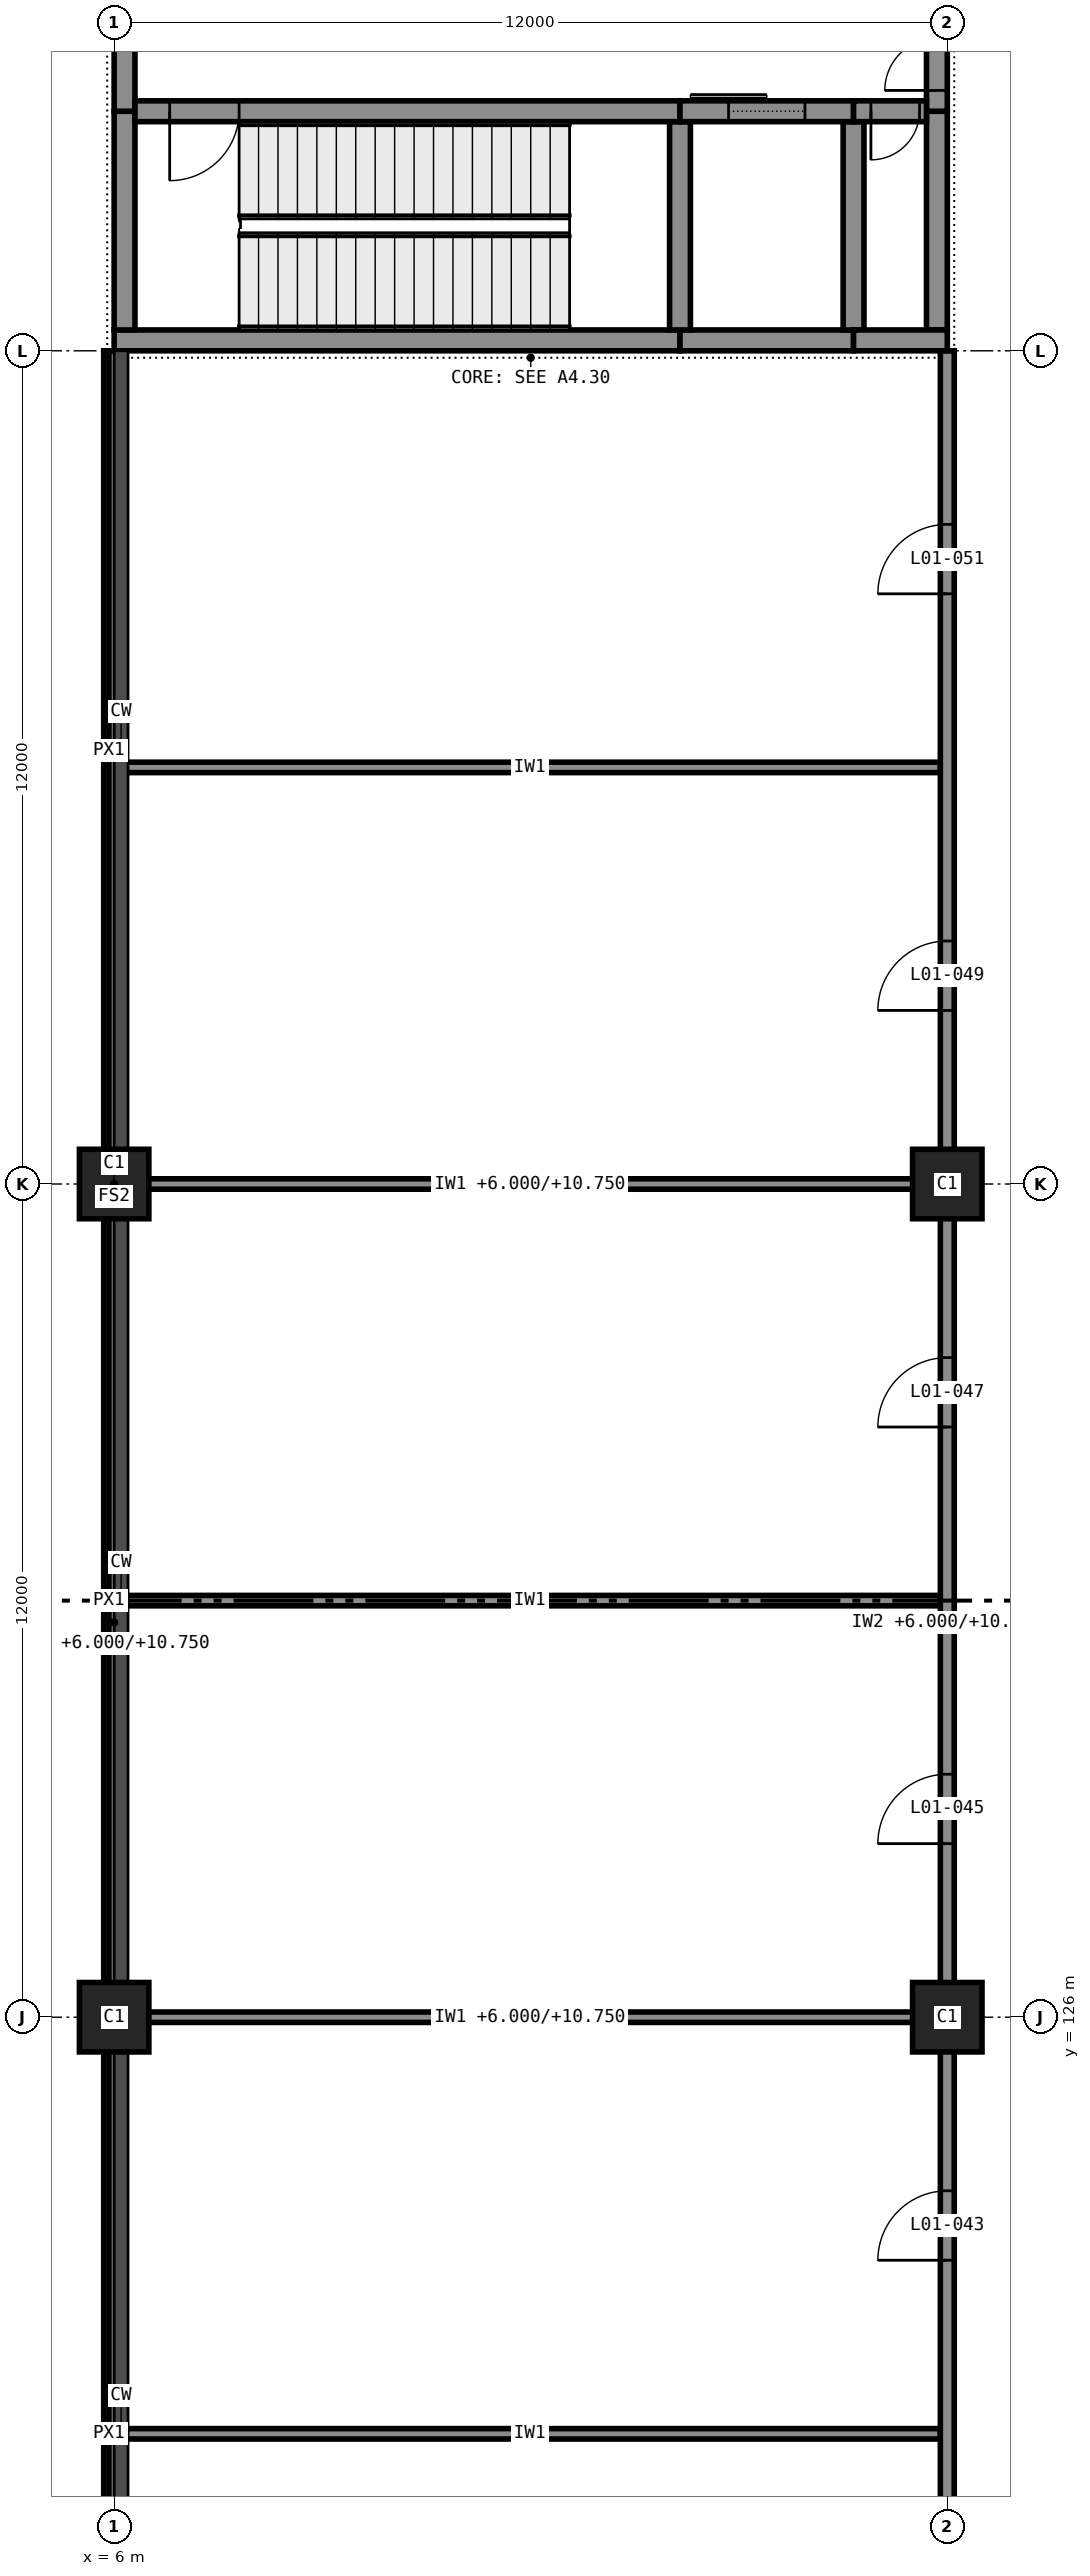
"""IFC4 building model, lengths in metres.
Left out: names, types, materials, properties, quantities, classifications, styles, units other than length and angle.
Written with IfcOpenShell. Run it as: python <this file> out.ifc"""

import sys

from ifc_helpers import new_model, si_unit, direction, frame, frame_2d, origin, origin_2d, place, context, subcontext, project, spatial, rectangle, extrude, element, fill, save


model = new_model("IFC4")
c1 = context("Model", 3, precision=1e-05, world=origin(), true_north=direction((0.0, 1.0)))
c2 = subcontext(c1, "Body", "Model", "MODEL_VIEW")
j1 = project(units=[si_unit("LENGTHUNIT", "METRE"), si_unit("PLANEANGLEUNIT", "RADIAN")], contexts=[c1])
p1 = place(None, origin())
s1 = spatial("IfcSite", under=j1, at=p1, CompositionType="ELEMENT")
p2 = place(p1, origin())
s2 = spatial("IfcBuilding", under=s1, at=p2, CompositionType="ELEMENT")
p3 = place(p2, frame((0.0, 0.0, 6.0)))
s3 = spatial("IfcBuildingStorey", under=s2, at=p3, CompositionType="ELEMENT", Elevation=6.0)
for number, where, z_axis, x_axis in (
    (1, (6.0, 126.0, 0.0), (0.0, 0.0, 1.0), (1.0, 0.0, 0.0)),
    (2, (6.0, 138.0, 0.0), (0.0, 0.0, 1.0), (1.0, 0.0, 0.0)),
    (3, (18.0, 126.0, 0.0), (0.0, 0.0, 1.0), (1.0, 0.0, 0.0)),
    (4, (18.0, 138.0, 0.0), (0.0, 0.0, 1.0), (1.0, 0.0, 0.0)),
):
    element("IfcColumn", number, at=place(p3, frame(where, z_axis=z_axis, x_axis=x_axis)), inside=s3, PredefinedType="COLUMN", context=c2, shape_type="SweptSolid", body=[
        extrude(rectangle(XDim=1.0, YDim=1.0, at=origin_2d()), origin(), (0.0, 0.0, 1.0), 6.0),
    ])
p4 = place(p3, frame((6.0, 150.15, 0.0), z_axis=(0.0, 0.0, 1.0), x_axis=(1.0, 0.0, 0.0)))
e5 = element("IfcWall", 5, at=p4, inside=s3, PredefinedType="SHEAR", context=c2, shape_type="SweptSolid", body=[
    extrude(rectangle(XDim=8.15, YDim=0.3, at=frame_2d((4.075, 0.0))), origin(), (0.0, 0.0, 1.0), 5.75),
])
p5 = place(p3, frame((14.15, 150.15, 0.0), z_axis=(0.0, 0.0, 1.0), x_axis=(1.0, 0.0, 0.0)))
e6 = element("IfcWall", 6, at=p5, inside=s3, PredefinedType="SHEAR", context=c2, shape_type="SweptSolid", body=[
    extrude(rectangle(XDim=2.5, YDim=0.3, at=frame_2d((1.25, 0.0))), origin(), (0.0, 0.0, 1.0), 5.75),
])
p6 = place(p3, frame((16.65, 150.15, 0.0), z_axis=(0.0, 0.0, 1.0), x_axis=(1.0, 0.0, 0.0)))
e7 = element("IfcWall", 7, at=p6, inside=s3, PredefinedType="SHEAR", context=c2, shape_type="SweptSolid", body=[
    extrude(rectangle(XDim=1.35, YDim=0.3, at=frame_2d((0.675, 0.0))), origin(), (0.0, 0.0, 1.0), 5.75),
])
p7 = place(p3, frame((6.3, 153.45, 0.0), z_axis=(0.0, 0.0, 1.0), x_axis=(1.0, 0.0, 0.0)))
e8 = element("IfcWall", 8, at=p7, inside=s3, PredefinedType="SHEAR", context=c2, shape_type="SweptSolid", body=[
    extrude(rectangle(XDim=7.85, YDim=0.3, at=frame_2d((3.925, 0.0))), origin(), (0.0, 0.0, 1.0), 5.75),
])
p8 = place(p7, frame((0.5, 0.0, 0.0)))
e9 = element("IfcOpeningElement", 9, at=p8, cuts=e8, PredefinedType="OPENING", context=c2, shape_type="SweptSolid", body=[
    extrude(rectangle(XDim=1.0, YDim=2.1, at=frame_2d((0.5, 1.05))), frame((0.0, 0.16, 0.0), z_axis=(0.0, -1.0, 0.0), x_axis=(1.0, 0.0, 0.0)), (0.0, 0.0, 1.0), 0.32),
])
p9 = place(p3, frame((14.15, 153.45, 0.0), z_axis=(0.0, 0.0, 1.0), x_axis=(1.0, 0.0, 0.0)))
e10 = element("IfcWall", 10, at=p9, inside=s3, PredefinedType="SHEAR", context=c2, shape_type="SweptSolid", body=[
    extrude(rectangle(XDim=2.5, YDim=0.3, at=frame_2d((1.25, 0.0))), origin(), (0.0, 0.0, 1.0), 5.75),
])
p10 = place(p9, frame((0.7, 0.0, 0.0)))
e11 = element("IfcOpeningElement", 11, at=p10, cuts=e10, PredefinedType="OPENING", context=c2, shape_type="SweptSolid", body=[
    extrude(rectangle(XDim=1.1, YDim=2.1, at=frame_2d((0.55, 1.05))), frame((0.0, 0.16, 0.0), z_axis=(0.0, -1.0, 0.0), x_axis=(1.0, 0.0, 0.0)), (0.0, 0.0, 1.0), 0.32),
])
p11 = place(p3, frame((16.65, 153.45, 0.0), z_axis=(0.0, 0.0, 1.0), x_axis=(1.0, 0.0, 0.0)))
e12 = element("IfcWall", 12, at=p11, inside=s3, PredefinedType="SHEAR", context=c2, shape_type="SweptSolid", body=[
    extrude(rectangle(XDim=1.05, YDim=0.3, at=frame_2d((0.525, 0.0))), origin(), (0.0, 0.0, 1.0), 5.75),
])
p12 = place(p11, frame((0.25, 0.0, 0.0)))
e13 = element("IfcOpeningElement", 13, at=p12, cuts=e12, PredefinedType="OPENING", context=c2, shape_type="SweptSolid", body=[
    extrude(rectangle(XDim=0.7, YDim=2.1, at=frame_2d((0.35, 1.05))), frame((0.0, 0.16, 0.0), z_axis=(0.0, -1.0, 0.0), x_axis=(1.0, 0.0, 0.0)), (0.0, 0.0, 1.0), 0.32),
])
p13 = place(p3, frame((6.15, 150.3, 0.0), z_axis=(0.0, 0.0, 1.0), x_axis=(0.0, 1.0, 0.0)))
e14 = element("IfcWall", 14, at=p13, inside=s3, PredefinedType="SHEAR", context=c2, shape_type="SweptSolid", body=[
    extrude(rectangle(XDim=3.15, YDim=0.3, at=frame_2d((1.575, 0.0))), origin(), (0.0, 0.0, 1.0), 5.75),
])
p14 = place(p3, frame((6.15, 153.45, 0.0), z_axis=(0.0, 0.0, 1.0), x_axis=(0.0, 1.0, 0.0)))
e15 = element("IfcWall", 15, at=p14, inside=s3, PredefinedType="SHEAR", context=c2, shape_type="SweptSolid", body=[
    extrude(rectangle(XDim=5.1, YDim=0.3, at=frame_2d((2.55, 0.0))), origin(), (0.0, 0.0, 1.0), 5.75),
])
p15 = place(p3, frame((17.85, 150.3, 0.0), z_axis=(0.0, 0.0, 1.0), x_axis=(0.0, 1.0, 0.0)))
e16 = element("IfcWall", 16, at=p15, inside=s3, PredefinedType="SHEAR", context=c2, shape_type="SweptSolid", body=[
    extrude(rectangle(XDim=3.15, YDim=0.3, at=frame_2d((1.575, 0.0))), origin(), (0.0, 0.0, 1.0), 5.75),
])
p16 = place(p3, frame((17.85, 153.45, 0.0), z_axis=(0.0, 0.0, 1.0), x_axis=(0.0, 1.0, 0.0)))
e17 = element("IfcWall", 17, at=p16, inside=s3, PredefinedType="SHEAR", context=c2, shape_type="SweptSolid", body=[
    extrude(rectangle(XDim=5.1, YDim=0.3, at=frame_2d((2.55, 0.0))), origin(), (0.0, 0.0, 1.0), 5.75),
])
p17 = place(p16, frame((0.3, 0.0, 0.0)))
e18 = element("IfcOpeningElement", 18, at=p17, cuts=e17, PredefinedType="OPENING", context=c2, shape_type="SweptSolid", body=[
    extrude(rectangle(XDim=1.5, YDim=2.1, at=frame_2d((0.75, 1.05))), frame((0.0, 0.16, 0.0), z_axis=(0.0, -1.0, 0.0), x_axis=(1.0, 0.0, 0.0)), (0.0, 0.0, 1.0), 0.32),
])
for number, where, z_axis, x_axis in (
    (19, (14.15, 150.3, 0.0), (0.0, 0.0, 1.0), (0.0, 1.0, 0.0)),
    (20, (16.65, 150.3, 0.0), (0.0, 0.0, 1.0), (0.0, 1.0, 0.0)),
):
    element("IfcWall", number, at=place(p3, frame(where, z_axis=z_axis, x_axis=x_axis)), inside=s3, PredefinedType="SHEAR", context=c2, shape_type="SweptSolid", body=[
        extrude(rectangle(XDim=3.0, YDim=0.3, at=frame_2d((1.5, 0.0))), origin(), (0.0, 0.0, 1.0), 5.75),
    ])
p18 = place(p3, frame((5.925, 150.0, 5.75), z_axis=(0.0, 0.0, 1.0), x_axis=(0.0, -1.0, 0.0)))
e21 = element("IfcWall", 21, at=p18, inside=s3, PredefinedType="STANDARD", context=c2, shape_type="SweptSolid", body=[
    extrude(rectangle(XDim=11.5, YDim=0.15, at=frame_2d((5.75, 0.0))), origin(), (0.0, 0.0, 1.0), 0.25),
])
for number, where, z_axis, x_axis in (
    (22, (5.925, 137.5, 5.75), (0.0, 0.0, 1.0), (0.0, -1.0, 0.0)),
    (23, (5.925, 125.5, 5.75), (0.0, 0.0, 1.0), (0.0, -1.0, 0.0)),
):
    element("IfcWall", number, at=place(p3, frame(where, z_axis=z_axis, x_axis=x_axis)), inside=s3, PredefinedType="STANDARD", context=c2, shape_type="SweptSolid", body=[
        extrude(rectangle(XDim=11.0, YDim=0.15, at=frame_2d((5.5, 0.0))), origin(), (0.0, 0.0, 1.0), 0.25),
    ])
p19 = place(p3, frame((6.075, 120.0, 0.0), z_axis=(0.0, 0.0, 1.0), x_axis=(1.0, 0.0, 0.0)))
e24 = element("IfcWall", 24, at=p19, inside=s3, PredefinedType="PARTITIONING", context=c2, shape_type="SweptSolid", body=[
    extrude(rectangle(XDim=11.825, YDim=0.15, at=frame_2d((5.913, 0.0))), origin(), (0.0, 0.0, 1.0), 5.75),
])
p20 = place(p3, frame((6.075, 126.0, 0.0), z_axis=(0.0, 0.0, 1.0), x_axis=(1.0, 0.0, 0.0)))
e25 = element("IfcWall", 25, at=p20, inside=s3, PredefinedType="PARTITIONING", context=c2, shape_type="SweptSolid", body=[
    extrude(rectangle(XDim=11.825, YDim=0.15, at=frame_2d((5.913, 0.0))), origin(), (0.0, 0.0, 1.0), 4.75),
])
p21 = place(p3, frame((6.075, 132.0, 0.0), z_axis=(0.0, 0.0, 1.0), x_axis=(1.0, 0.0, 0.0)))
e26 = element("IfcWall", 26, at=p21, inside=s3, PredefinedType="PARTITIONING", context=c2, shape_type="SweptSolid", body=[
    extrude(rectangle(XDim=11.825, YDim=0.15, at=frame_2d((5.913, 0.0))), origin(), (0.0, 0.0, 1.0), 5.75),
])
p22 = place(p3, frame((6.075, 138.0, 0.0), z_axis=(0.0, 0.0, 1.0), x_axis=(1.0, 0.0, 0.0)))
e27 = element("IfcWall", 27, at=p22, inside=s3, PredefinedType="PARTITIONING", context=c2, shape_type="SweptSolid", body=[
    extrude(rectangle(XDim=11.825, YDim=0.15, at=frame_2d((5.913, 0.0))), origin(), (0.0, 0.0, 1.0), 4.75),
])
p23 = place(p3, frame((6.075, 144.0, 0.0), z_axis=(0.0, 0.0, 1.0), x_axis=(1.0, 0.0, 0.0)))
e28 = element("IfcWall", 28, at=p23, inside=s3, PredefinedType="PARTITIONING", context=c2, shape_type="SweptSolid", body=[
    extrude(rectangle(XDim=11.825, YDim=0.15, at=frame_2d((5.913, 0.0))), origin(), (0.0, 0.0, 1.0), 5.75),
])
p24 = place(p3, frame((6.0, 102.0, 0.0), z_axis=(0.0, 0.0, 1.0), x_axis=(0.0, 1.0, 0.0)))
e29 = element("IfcWall", 29, at=p24, inside=s3, PredefinedType="PARTITIONING", context=c2, shape_type="SweptSolid", body=[
    extrude(rectangle(XDim=48.0, YDim=0.15, at=frame_2d((24.0, 0.0))), origin(), (0.0, 0.0, 1.0), 4.75),
])
p25 = place(p3, frame((18.0, 102.0, 0.0), z_axis=(0.0, 0.0, 1.0), x_axis=(0.0, 1.0, 0.0)))
e30 = element("IfcWall", 30, at=p25, inside=s3, PredefinedType="PARTITIONING", context=c2, shape_type="SweptSolid", body=[
    extrude(rectangle(XDim=48.0, YDim=0.2, at=frame_2d((24.0, 0.0))), origin(), (0.0, 0.0, 1.0), 4.75),
])
p26 = place(p25, frame((2.5, 0.0, 0.0)))
e31 = element("IfcOpeningElement", 31, at=p26, cuts=e30, PredefinedType="OPENING", context=c2, shape_type="SweptSolid", body=[
    extrude(rectangle(XDim=1.0, YDim=2.1, at=frame_2d((0.5, 1.05))), frame((0.0, 0.11, 0.0), z_axis=(0.0, -1.0, 0.0), x_axis=(1.0, 0.0, 0.0)), (0.0, 0.0, 1.0), 0.22),
])
p27 = place(p25, frame((8.5, 0.0, 0.0)))
e32 = element("IfcOpeningElement", 32, at=p27, cuts=e30, PredefinedType="OPENING", context=c2, shape_type="SweptSolid", body=[
    extrude(rectangle(XDim=1.0, YDim=2.1, at=frame_2d((0.5, 1.05))), frame((0.0, 0.11, 0.0), z_axis=(0.0, -1.0, 0.0), x_axis=(1.0, 0.0, 0.0)), (0.0, 0.0, 1.0), 0.22),
])
p28 = place(p25, frame((14.5, 0.0, 0.0)))
e33 = element("IfcOpeningElement", 33, at=p28, cuts=e30, PredefinedType="OPENING", context=c2, shape_type="SweptSolid", body=[
    extrude(rectangle(XDim=1.0, YDim=2.1, at=frame_2d((0.5, 1.05))), frame((0.0, 0.11, 0.0), z_axis=(0.0, -1.0, 0.0), x_axis=(1.0, 0.0, 0.0)), (0.0, 0.0, 1.0), 0.22),
])
p29 = place(p25, frame((20.5, 0.0, 0.0)))
e34 = element("IfcOpeningElement", 34, at=p29, cuts=e30, PredefinedType="OPENING", context=c2, shape_type="SweptSolid", body=[
    extrude(rectangle(XDim=1.0, YDim=2.1, at=frame_2d((0.5, 1.05))), frame((0.0, 0.11, 0.0), z_axis=(0.0, -1.0, 0.0), x_axis=(1.0, 0.0, 0.0)), (0.0, 0.0, 1.0), 0.22),
])
p30 = place(p25, frame((26.5, 0.0, 0.0)))
e35 = element("IfcOpeningElement", 35, at=p30, cuts=e30, PredefinedType="OPENING", context=c2, shape_type="SweptSolid", body=[
    extrude(rectangle(XDim=1.0, YDim=2.1, at=frame_2d((0.5, 1.05))), frame((0.0, 0.11, 0.0), z_axis=(0.0, -1.0, 0.0), x_axis=(1.0, 0.0, 0.0)), (0.0, 0.0, 1.0), 0.22),
])
p31 = place(p25, frame((32.5, 0.0, 0.0)))
e36 = element("IfcOpeningElement", 36, at=p31, cuts=e30, PredefinedType="OPENING", context=c2, shape_type="SweptSolid", body=[
    extrude(rectangle(XDim=1.0, YDim=2.1, at=frame_2d((0.5, 1.05))), frame((0.0, 0.11, 0.0), z_axis=(0.0, -1.0, 0.0), x_axis=(1.0, 0.0, 0.0)), (0.0, 0.0, 1.0), 0.22),
])
p32 = place(p25, frame((38.5, 0.0, 0.0)))
e37 = element("IfcOpeningElement", 37, at=p32, cuts=e30, PredefinedType="OPENING", context=c2, shape_type="SweptSolid", body=[
    extrude(rectangle(XDim=1.0, YDim=2.1, at=frame_2d((0.5, 1.05))), frame((0.0, 0.11, 0.0), z_axis=(0.0, -1.0, 0.0), x_axis=(1.0, 0.0, 0.0)), (0.0, 0.0, 1.0), 0.22),
])
p33 = place(p25, frame((44.5, 0.0, 0.0)))
e38 = element("IfcOpeningElement", 38, at=p33, cuts=e30, PredefinedType="OPENING", context=c2, shape_type="SweptSolid", body=[
    extrude(rectangle(XDim=1.0, YDim=2.1, at=frame_2d((0.5, 1.05))), frame((0.0, 0.11, 0.0), z_axis=(0.0, -1.0, 0.0), x_axis=(1.0, 0.0, 0.0)), (0.0, 0.0, 1.0), 0.22),
])
p34 = place(p29, origin())
e39 = element("IfcDoor", 39, at=p34, inside=s3, OperationType="SINGLE_SWING_RIGHT", PredefinedType="DOOR", context=c2, shape_type="SweptSolid", body=[
    extrude(rectangle(XDim=1.0, YDim=2.1, at=frame_2d((0.5, 1.05))), frame((0.0, 0.025, 0.0), z_axis=(0.0, -1.0, 0.0), x_axis=(1.0, 0.0, 0.0)), (0.0, 0.0, 1.0), 0.05),
])
fill(e34, e39)
p35 = place(p30, origin())
e40 = element("IfcDoor", 40, at=p35, inside=s3, OperationType="SINGLE_SWING_RIGHT", PredefinedType="DOOR", context=c2, shape_type="SweptSolid", body=[
    extrude(rectangle(XDim=1.0, YDim=2.1, at=frame_2d((0.5, 1.05))), frame((0.0, 0.025, 0.0), z_axis=(0.0, -1.0, 0.0), x_axis=(1.0, 0.0, 0.0)), (0.0, 0.0, 1.0), 0.05),
])
fill(e35, e40)
p36 = place(p31, origin())
e41 = element("IfcDoor", 41, at=p36, inside=s3, OperationType="SINGLE_SWING_RIGHT", PredefinedType="DOOR", context=c2, shape_type="SweptSolid", body=[
    extrude(rectangle(XDim=1.0, YDim=2.1, at=frame_2d((0.5, 1.05))), frame((0.0, 0.025, 0.0), z_axis=(0.0, -1.0, 0.0), x_axis=(1.0, 0.0, 0.0)), (0.0, 0.0, 1.0), 0.05),
])
fill(e36, e41)
p37 = place(p32, origin())
e42 = element("IfcDoor", 42, at=p37, inside=s3, OperationType="SINGLE_SWING_RIGHT", PredefinedType="DOOR", context=c2, shape_type="SweptSolid", body=[
    extrude(rectangle(XDim=1.0, YDim=2.1, at=frame_2d((0.5, 1.05))), frame((0.0, 0.025, 0.0), z_axis=(0.0, -1.0, 0.0), x_axis=(1.0, 0.0, 0.0)), (0.0, 0.0, 1.0), 0.05),
])
fill(e37, e42)
p38 = place(p33, origin())
e43 = element("IfcDoor", 43, at=p38, inside=s3, OperationType="SINGLE_SWING_RIGHT", PredefinedType="DOOR", context=c2, shape_type="SweptSolid", body=[
    extrude(rectangle(XDim=1.0, YDim=2.1, at=frame_2d((0.5, 1.05))), frame((0.0, 0.025, 0.0), z_axis=(0.0, -1.0, 0.0), x_axis=(1.0, 0.0, 0.0)), (0.0, 0.0, 1.0), 0.05),
])
fill(e38, e43)
p39 = place(p8, frame((1.0, 0.0, 0.0), z_axis=(0.0, 0.0, 1.0), x_axis=(-1.0, 0.0, 0.0)))
e44 = element("IfcDoor", 44, at=p39, inside=s3, OperationType="SINGLE_SWING_LEFT", PredefinedType="DOOR", context=c2, shape_type="SweptSolid", body=[
    extrude(rectangle(XDim=1.0, YDim=2.1, at=frame_2d((0.5, 1.05))), frame((0.0, 0.025, 0.0), z_axis=(0.0, -1.0, 0.0), x_axis=(1.0, 0.0, 0.0)), (0.0, 0.0, 1.0), 0.05),
])
fill(e9, e44)
p40 = place(p10, origin())
e45 = element("IfcDoor", 45, at=p40, inside=s3, OperationType="SLIDING_TO_LEFT", PredefinedType="DOOR", context=c2, shape_type="SweptSolid", body=[
    extrude(rectangle(XDim=1.1, YDim=2.1, at=frame_2d((0.55, 1.05))), frame((0.0, 0.025, 0.0), z_axis=(0.0, -1.0, 0.0), x_axis=(1.0, 0.0, 0.0)), (0.0, 0.0, 1.0), 0.05),
])
fill(e11, e45)
p41 = place(p12, frame((0.7, 0.0, 0.0), z_axis=(0.0, 0.0, 1.0), x_axis=(-1.0, 0.0, 0.0)))
e46 = element("IfcDoor", 46, at=p41, inside=s3, OperationType="SINGLE_SWING_LEFT", PredefinedType="DOOR", context=c2, shape_type="SweptSolid", body=[
    extrude(rectangle(XDim=0.7, YDim=2.1, at=frame_2d((0.35, 1.05))), frame((0.0, 0.025, 0.0), z_axis=(0.0, -1.0, 0.0), x_axis=(1.0, 0.0, 0.0)), (0.0, 0.0, 1.0), 0.05),
])
fill(e13, e46)
p42 = place(p17, origin())
e47 = element("IfcDoor", 47, at=p42, inside=s3, OperationType="DOUBLE_DOOR_SINGLE_SWING", PredefinedType="DOOR", context=c2, shape_type="SweptSolid", body=[
    extrude(rectangle(XDim=1.5, YDim=2.1, at=frame_2d((0.75, 1.05))), frame((0.0, 0.025, 0.0), z_axis=(0.0, -1.0, 0.0), x_axis=(1.0, 0.0, 0.0)), (0.0, 0.0, 1.0), 0.05),
])
fill(e18, e47)
save(model, sys.argv[1])
